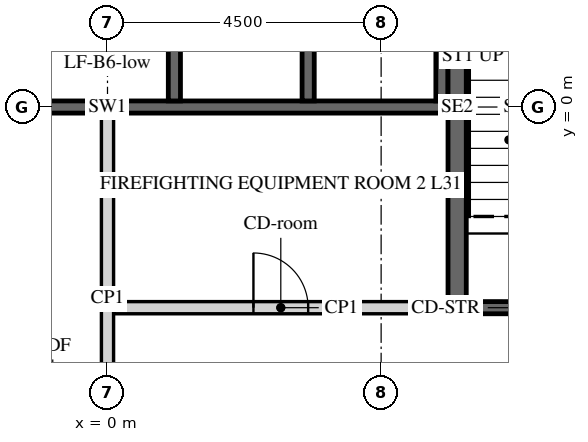
"""IFC4 building model, lengths in metres.
Left out: names, types, materials, properties, quantities, classifications, styles, units other than length and angle.
Written with IfcOpenShell. Run it as: python <this file> out.ifc"""

import sys

from ifc_helpers import new_model, si_unit, direction, frame, frame_2d, origin, place, context, subcontext, project, spatial, polyline, rectangle, outline, extrude, element, fill, save


model = new_model("IFC4")
c1 = context("Model", 3, precision=1e-05, world=origin(), true_north=direction((0.0, 1.0)))
c2 = subcontext(c1, "Body", "Model", "MODEL_VIEW")
j1 = project(units=[si_unit("LENGTHUNIT", "METRE"), si_unit("PLANEANGLEUNIT", "RADIAN")], contexts=[c1])
p1 = place(None, origin())
s1 = spatial("IfcSite", under=j1, at=p1, CompositionType="ELEMENT")
p2 = place(p1, origin())
s2 = spatial("IfcBuilding", under=s1, at=p2, CompositionType="ELEMENT")
p3 = place(p2, frame((0.0, 0.0, 135.0)))
s3 = spatial("IfcBuildingStorey", under=s2, at=p3, CompositionType="ELEMENT", Elevation=135.0)
p4 = place(p3, frame((5.673, -9.825, -0.15), z_axis=(0.0, 0.0, 1.0), x_axis=(0.499995046907, 0.866028263435, 0.0)))
e1 = element("IfcWall", 1, at=p4, inside=s3, PredefinedType="SHEAR", context=c2, shape_type="SweptSolid", body=[
    extrude(outline(polyline([(-0.101, -0.175), (11.446, -0.175), (11.244, 0.175), (0.101, 0.175), (-0.101, -0.175)])), origin(), (0.0, 0.0, 1.0), 3.9),
])
p5 = place(p4, frame((4.801, 0.0, 0.15)))
e2 = element("IfcOpeningElement", 2, at=p5, cuts=e1, PredefinedType="OPENING", context=c2, shape_type="SweptSolid", body=[
    extrude(rectangle(XDim=1.8, YDim=2.4, at=frame_2d((0.9, 1.2))), frame((0.0, 0.185, 0.0), z_axis=(0.0, -1.0, 0.0), x_axis=(1.0, 0.0, 0.0)), (0.0, 0.0, 1.0), 0.37),
])
p6 = place(p3, frame((11.345, 0.0, -0.15), z_axis=(0.0, 0.0, 1.0), x_axis=(-0.499995046907, 0.866028263435, 0.0)))
e3 = element("IfcWall", 3, at=p6, inside=s3, PredefinedType="SHEAR", context=c2, shape_type="SweptSolid", body=[
    extrude(outline(polyline([(-0.101, -0.175), (11.446, -0.175), (11.244, 0.175), (0.101, 0.175), (-0.101, -0.175)])), origin(), (0.0, 0.0, 1.0), 3.9),
])
p7 = place(p6, frame((4.744, 0.0, 0.15)))
e4 = element("IfcOpeningElement", 4, at=p7, cuts=e3, PredefinedType="OPENING", context=c2, shape_type="SweptSolid", body=[
    extrude(rectangle(XDim=1.8, YDim=2.4, at=frame_2d((0.9, 1.2))), frame((0.0, 0.185, 0.0), z_axis=(0.0, -1.0, 0.0), x_axis=(1.0, 0.0, 0.0)), (0.0, 0.0, 1.0), 0.37),
])
p8 = place(p3, frame((-5.6, 0.0, -0.25), z_axis=(0.0, 0.0, 1.0), x_axis=(1.0, 0.0, 0.0)))
e5 = element("IfcWall", 5, at=p8, inside=s3, PredefinedType="SHEAR", context=c2, shape_type="SweptSolid", body=[
    extrude(rectangle(XDim=11.2, YDim=0.2, at=frame_2d((5.6, 0.0))), origin(), (0.0, 0.0, 1.0), 3.9),
])
for number, where, z_axis, x_axis in (
    (6, (1.1, 0.1, -0.25), (0.0, 0.0, 1.0), (0.0, 1.0, 0.0)),
    (7, (3.3, 0.1, -0.25), (0.0, 0.0, 1.0), (0.0, 1.0, 0.0)),
    (8, (5.5, 0.1, -0.25), (0.0, 0.0, 1.0), (0.0, 1.0, 0.0)),
):
    element("IfcWall", number, at=place(p3, frame(where, z_axis=z_axis, x_axis=x_axis)), inside=s3, PredefinedType="SHEAR", context=c2, shape_type="SweptSolid", body=[
        extrude(rectangle(XDim=3.1, YDim=0.2, at=frame_2d((1.55, 0.0))), origin(), (0.0, 0.0, 1.0), 3.9),
    ])
p9 = place(p3, frame((0.1, -3.3, 0.0), z_axis=(0.0, 0.0, 1.0), x_axis=(1.0, 0.0, 0.0)))
e9 = element("IfcWall", 9, at=p9, inside=s3, PredefinedType="PARTITIONING", context=c2, shape_type="SweptSolid", body=[
    extrude(rectangle(XDim=5.5, YDim=0.2, at=frame_2d((2.75, 0.0))), origin(), (0.0, 0.0, 1.0), 3.65),
])
p10 = place(p9, frame((2.3, 0.0, 0.0)))
e10 = element("IfcOpeningElement", 10, at=p10, cuts=e9, PredefinedType="OPENING", context=c2, shape_type="SweptSolid", body=[
    extrude(rectangle(XDim=0.9, YDim=2.1, at=frame_2d((0.45, 1.05))), frame((0.0, 0.11, 0.0), z_axis=(0.0, -1.0, 0.0), x_axis=(1.0, 0.0, 0.0)), (0.0, 0.0, 1.0), 0.22),
])
p11 = place(p3, frame((0.0, -6.2, 0.0), z_axis=(0.0, 0.0, 1.0), x_axis=(0.0, 1.0, 0.0)))
e11 = element("IfcWall", 11, at=p11, inside=s3, PredefinedType="PARTITIONING", context=c2, shape_type="SweptSolid", body=[
    extrude(rectangle(XDim=6.1, YDim=0.2, at=frame_2d((3.05, 0.0))), origin(), (0.0, 0.0, 1.0), 3.65),
])
p12 = place(p3, frame((5.75, -3.4, -0.25), z_axis=(0.0, 0.0, 1.0), x_axis=(0.0, 1.0, 0.0)))
e12 = element("IfcWall", 12, at=p12, inside=s3, PredefinedType="SHEAR", context=c2, shape_type="SweptSolid", body=[
    extrude(rectangle(XDim=6.8, YDim=0.3, at=frame_2d((3.4, 0.0))), origin(), (0.0, 0.0, 1.0), 3.9),
])
p13 = place(p3, frame((5.9, -3.3, -0.25), z_axis=(0.0, 0.0, 1.0), x_axis=(1.0, 0.0, 0.0)))
e13 = element("IfcWall", 13, at=p13, inside=s3, PredefinedType="SHEAR", context=c2, shape_type="SweptSolid", body=[
    extrude(rectangle(XDim=2.95, YDim=0.2, at=frame_2d((1.475, 0.0))), origin(), (0.0, 0.0, 1.0), 3.9),
])
p14 = place(p13, frame((0.875, 0.0, 0.25)))
e14 = element("IfcOpeningElement", 14, at=p14, cuts=e13, PredefinedType="OPENING", context=c2, shape_type="SweptSolid", body=[
    extrude(rectangle(XDim=1.2, YDim=2.4, at=frame_2d((0.6, 1.2))), frame((0.0, 0.11, 0.0), z_axis=(0.0, -1.0, 0.0), x_axis=(1.0, 0.0, 0.0)), (0.0, 0.0, 1.0), 0.22),
])
p15 = place(p10, origin())
e15 = element("IfcDoor", 15, at=p15, inside=s3, OperationType="SINGLE_SWING_LEFT", PredefinedType="DOOR", context=c2, shape_type="SweptSolid", body=[
    extrude(rectangle(XDim=0.9, YDim=2.1, at=frame_2d((0.45, 1.05))), frame((0.0, 0.025, 0.0), z_axis=(0.0, -1.0, 0.0), x_axis=(1.0, 0.0, 0.0)), (0.0, 0.0, 1.0), 0.05),
])
fill(e10, e15)
save(model, sys.argv[1])
